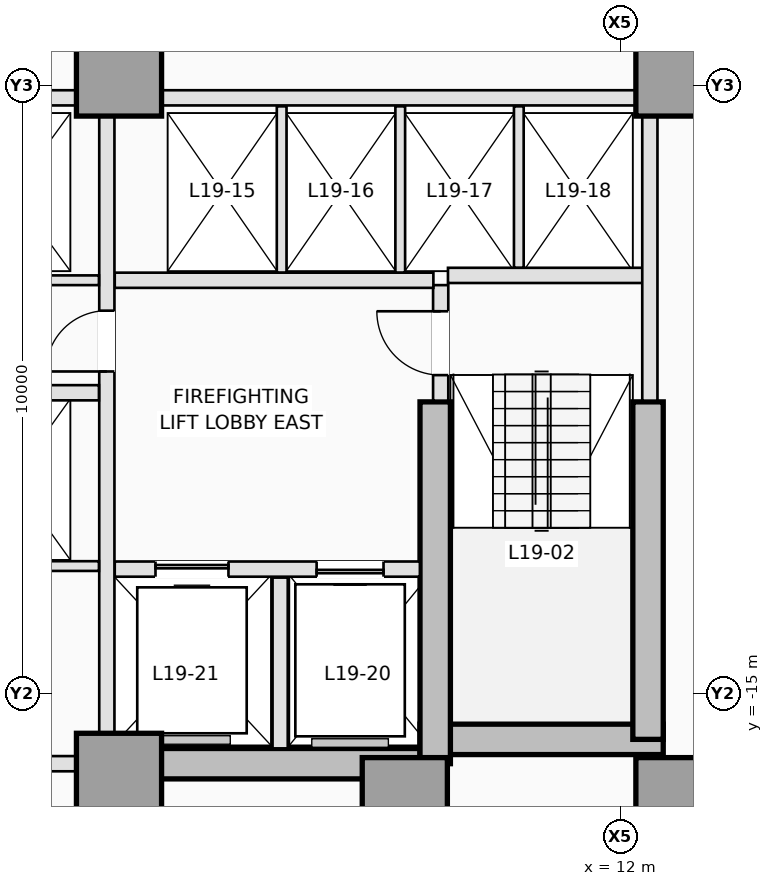
"""IFC4 building model, lengths in metres.
Left out: names, types, materials, properties, quantities, classifications, styles, units other than length and angle.
Written with IfcOpenShell. Run it as: python <this file> out.ifc"""

import sys

from ifc_helpers import new_model, si_unit, direction, frame, frame_2d, origin, origin_2d, place, context, subcontext, project, spatial, rectangle, extrude, element, fill, save


model = new_model("IFC4")
c1 = context("Model", 3, precision=1e-05, world=origin(), true_north=direction((0.0, 1.0)))
c2 = subcontext(c1, "Body", "Model", "MODEL_VIEW")
j1 = project(units=[si_unit("LENGTHUNIT", "METRE"), si_unit("PLANEANGLEUNIT", "RADIAN")], contexts=[c1])
p1 = place(None, origin())
s1 = spatial("IfcSite", under=j1, at=p1, CompositionType="ELEMENT")
p2 = place(p1, origin())
s2 = spatial("IfcBuilding", under=s1, at=p2, CompositionType="ELEMENT")
p3 = place(p2, frame((0.0, 0.0, 73.1)))
s3 = spatial("IfcBuildingStorey", under=s2, at=p3, CompositionType="ELEMENT", Elevation=73.1)
p4 = place(p3, frame((3.75, -16.15, 0.0), z_axis=(0.0, 0.0, 1.0), x_axis=(1.0, 0.0, 0.0)))
e1 = element("IfcWall", 1, at=p4, inside=s3, PredefinedType="SHEAR", context=c2, shape_type="SweptSolid", body=[
    extrude(rectangle(XDim=5.2, YDim=0.5, at=frame_2d((2.6, 0.0))), origin(), (0.0, 0.0, 1.0), 3.5),
])
p5 = place(p3, frame((8.7, -15.75, 0.0), z_axis=(0.0, 0.0, 1.0), x_axis=(1.0, 0.0, 0.0)))
e2 = element("IfcWall", 2, at=p5, inside=s3, PredefinedType="SHEAR", context=c2, shape_type="SweptSolid", body=[
    extrude(rectangle(XDim=4.0, YDim=0.5, at=frame_2d((2.0, 0.0))), origin(), (0.0, 0.0, 1.0), 3.5),
])
p6 = place(p3, frame((12.45, -15.75, 0.0), z_axis=(0.0, 0.0, 1.0), x_axis=(0.0, 1.0, 0.0)))
e3 = element("IfcWall", 3, at=p6, inside=s3, PredefinedType="SHEAR", context=c2, shape_type="SweptSolid", body=[
    extrude(rectangle(XDim=5.55, YDim=0.5, at=frame_2d((2.775, 0.0))), origin(), (0.0, 0.0, 1.0), 3.5),
])
p7 = place(p3, frame((8.95, -16.15, 0.0), z_axis=(0.0, 0.0, 1.0), x_axis=(0.0, 1.0, 0.0)))
e4 = element("IfcWall", 4, at=p7, inside=s3, PredefinedType="SHEAR", context=c2, shape_type="SweptSolid", body=[
    extrude(rectangle(XDim=5.95, YDim=0.5, at=frame_2d((2.975, 0.0))), origin(), (0.0, 0.0, 1.0), 3.5),
])
for number, where, z_axis, x_axis in (
    (5, (3.75, -16.35, 0.0), (0.0, 0.0, 1.0), (1.0, 0.0, 0.0)),
    (6, (8.45, -16.75, 0.0), (0.0, 0.0, 1.0), (1.0, 0.0, 0.0)),
    (7, (12.95, -16.75, 0.0), (0.0, 0.0, 1.0), (1.0, 0.0, 0.0)),
    (8, (3.75, -4.8, 0.0), (0.0, 0.0, 1.0), (1.0, 0.0, 0.0)),
    (9, (12.95, -4.8, 0.0), (0.0, 0.0, 1.0), (1.0, 0.0, 0.0)),
):
    element("IfcColumn", number, at=place(p3, frame(where, z_axis=z_axis, x_axis=x_axis)), inside=s3, PredefinedType="COLUMN", context=c2, shape_type="SweptSolid", body=[
        extrude(rectangle(XDim=1.4, YDim=1.4, at=origin_2d()), origin(), (0.0, 0.0, 1.0), 3.5),
    ])
p8 = place(p3, frame((9.04, -10.18, 0.0), z_axis=(0.0, 0.0, 1.0), x_axis=(0.0, 1.0, 0.0)))
e10 = element("IfcWall", 10, at=p8, inside=s3, PredefinedType="PARTITIONING", context=c2, shape_type="SweptSolid", body=[
    extrude(rectangle(XDim=1.9, YDim=0.25, at=frame_2d((0.95, 0.0))), origin(), (0.0, 0.0, 1.0), 3.25),
])
p9 = place(p8, frame((0.42, 0.0, 0.0)))
e11 = element("IfcOpeningElement", 11, at=p9, cuts=e10, PredefinedType="OPENING", context=c2, shape_type="SweptSolid", body=[
    extrude(rectangle(XDim=1.05, YDim=2.15, at=frame_2d((0.525, 1.075))), frame((0.0, 0.135, 0.0), z_axis=(0.0, -1.0, 0.0), x_axis=(1.0, 0.0, 0.0)), (0.0, 0.0, 1.0), 0.27),
])
p10 = place(p3, frame((9.16, -8.12, 0.0), z_axis=(0.0, 0.0, 1.0), x_axis=(1.0, 0.0, 0.0)))
e12 = element("IfcWall", 12, at=p10, inside=s3, PredefinedType="PARTITIONING", context=c2, shape_type="SweptSolid", body=[
    extrude(rectangle(XDim=3.22, YDim=0.25, at=frame_2d((1.61, 0.0))), origin(), (0.0, 0.0, 1.0), 3.25),
])
p11 = place(p3, frame((12.48, -10.18, 0.0), z_axis=(0.0, 0.0, 1.0), x_axis=(0.0, 1.0, 0.0)))
e13 = element("IfcWall", 13, at=p11, inside=s3, PredefinedType="PARTITIONING", context=c2, shape_type="SweptSolid", body=[
    extrude(rectangle(XDim=4.678, YDim=0.25, at=frame_2d((2.339, 0.0))), origin(), (0.0, 0.0, 1.0), 3.25),
])
p12 = place(p3, frame((3.68, -12.95, 0.0), z_axis=(0.0, 0.0, 1.0), x_axis=(1.0, 0.0, 0.0)))
e14 = element("IfcWall", 14, at=p12, inside=s3, PredefinedType="PARTITIONING", context=c2, shape_type="SweptSolid", body=[
    extrude(rectangle(XDim=5.018, YDim=0.25, at=frame_2d((2.509, 0.0))), origin(), (0.0, 0.0, 1.0), 3.25),
])
p13 = place(p12, frame((3.32, 0.0, 0.0)))
e15 = element("IfcOpeningElement", 15, at=p13, cuts=e14, PredefinedType="OPENING", context=c2, shape_type="SweptSolid", body=[
    extrude(rectangle(XDim=1.1, YDim=2.15, at=frame_2d((0.55, 1.075))), frame((0.0, 0.135, 0.0), z_axis=(0.0, -1.0, 0.0), x_axis=(1.0, 0.0, 0.0)), (0.0, 0.0, 1.0), 0.27),
])
p14 = place(p12, frame((0.67, 0.0, 0.0)))
e16 = element("IfcOpeningElement", 16, at=p14, cuts=e14, PredefinedType="OPENING", context=c2, shape_type="SweptSolid", body=[
    extrude(rectangle(XDim=1.2, YDim=2.15, at=frame_2d((0.6, 1.075))), frame((0.0, 0.135, 0.0), z_axis=(0.0, -1.0, 0.0), x_axis=(1.0, 0.0, 0.0)), (0.0, 0.0, 1.0), 0.27),
])
p15 = place(p3, frame((6.4, -15.898, 0.0), z_axis=(0.0, 0.0, 1.0), x_axis=(0.0, 1.0, 0.0)))
e17 = element("IfcWall", 17, at=p15, inside=s3, PredefinedType="PARTITIONING", context=c2, shape_type="SweptSolid", body=[
    extrude(rectangle(XDim=2.808, YDim=0.25, at=frame_2d((1.404, 0.0))), origin(), (0.0, 0.0, 1.0), 3.25),
])
p16 = place(p3, frame((3.68, -8.2, 0.0), z_axis=(0.0, 0.0, 1.0), x_axis=(1.0, 0.0, 0.0)))
e18 = element("IfcWall", 18, at=p16, inside=s3, PredefinedType="PARTITIONING", context=c2, shape_type="SweptSolid", body=[
    extrude(rectangle(XDim=5.24, YDim=0.25, at=frame_2d((2.62, 0.0))), origin(), (0.0, 0.0, 1.0), 3.25),
])
p17 = place(p3, frame((3.55, -15.648, 0.0), z_axis=(0.0, 0.0, 1.0), x_axis=(0.0, 1.0, 0.0)))
e19 = element("IfcWall", 19, at=p17, inside=s3, PredefinedType="PARTITIONING", context=c2, shape_type="SweptSolid", body=[
    extrude(rectangle(XDim=10.146, YDim=0.25, at=frame_2d((5.073, 0.0))), origin(), (0.0, 0.0, 1.0), 3.25),
])
p18 = place(p17, frame((5.948, 0.0, 0.0)))
e20 = element("IfcOpeningElement", 20, at=p18, cuts=e19, PredefinedType="OPENING", context=c2, shape_type="SweptSolid", body=[
    extrude(rectangle(XDim=1.0, YDim=2.15, at=frame_2d((0.5, 1.075))), frame((0.0, 0.135, 0.0), z_axis=(0.0, -1.0, 0.0), x_axis=(1.0, 0.0, 0.0)), (0.0, 0.0, 1.0), 0.27),
])
p19 = place(p3, frame((4.452, -5.2, 0.0), z_axis=(0.0, 0.0, 1.0), x_axis=(1.0, 0.0, 0.0)))
e21 = element("IfcWall", 21, at=p19, inside=s3, PredefinedType="PARTITIONING", context=c2, shape_type="SweptSolid", body=[
    extrude(rectangle(XDim=7.796, YDim=0.25, at=frame_2d((3.898, 0.0))), origin(), (0.0, 0.0, 1.0), 3.25),
])
p20 = place(p3, frame((0.95, -5.2, 0.0), z_axis=(0.0, 0.0, 1.0), x_axis=(1.0, 0.0, 0.0)))
e22 = element("IfcWall", 22, at=p20, inside=s3, PredefinedType="PARTITIONING", context=c2, shape_type="SweptSolid", body=[
    extrude(rectangle(XDim=2.098, YDim=0.25, at=frame_2d((1.049, 0.0))), origin(), (0.0, 0.0, 1.0), 3.25),
])
for number, where, z_axis, x_axis in (
    (23, (6.425, -8.073, 0.0), (0.0, 0.0, 1.0), (0.0, 1.0, 0.0)),
    (24, (8.375, -8.073, 0.0), (0.0, 0.0, 1.0), (0.0, 1.0, 0.0)),
):
    element("IfcWall", number, at=place(p3, frame(where, z_axis=z_axis, x_axis=x_axis)), inside=s3, PredefinedType="PARTITIONING", context=c2, shape_type="SweptSolid", body=[
        extrude(rectangle(XDim=2.733, YDim=0.16, at=frame_2d((1.366, 0.0))), origin(), (0.0, 0.0, 1.0), 3.25),
    ])
p21 = place(p3, frame((10.325, -7.993, 0.0), z_axis=(0.0, 0.0, 1.0), x_axis=(0.0, 1.0, 0.0)))
e25 = element("IfcWall", 25, at=p21, inside=s3, PredefinedType="PARTITIONING", context=c2, shape_type="SweptSolid", body=[
    extrude(rectangle(XDim=2.653, YDim=0.16, at=frame_2d((1.326, 0.0))), origin(), (0.0, 0.0, 1.0), 3.25),
])
p22 = place(p3, frame((-3.048, -16.15, 0.0), z_axis=(0.0, 0.0, 1.0), x_axis=(1.0, 0.0, 0.0)))
e26 = element("IfcWall", 26, at=p22, inside=s3, PredefinedType="PARTITIONING", context=c2, shape_type="SweptSolid", body=[
    extrude(rectangle(XDim=6.096, YDim=0.25, at=frame_2d((3.048, 0.0))), origin(), (0.0, 0.0, 1.0), 2.3),
])
p23 = place(p3, frame((0.95, -8.2, 0.0), z_axis=(0.0, 0.0, 1.0), x_axis=(1.0, 0.0, 0.0)))
e27 = element("IfcWall", 27, at=p23, inside=s3, PredefinedType="PARTITIONING", context=c2, shape_type="SweptSolid", body=[
    extrude(rectangle(XDim=2.47, YDim=0.16, at=frame_2d((1.235, 0.0))), origin(), (0.0, 0.0, 1.0), 3.25),
])
p24 = place(p3, frame((0.95, -10.05, 0.0), z_axis=(0.0, 0.0, 1.0), x_axis=(1.0, 0.0, 0.0)))
e28 = element("IfcWall", 28, at=p24, inside=s3, PredefinedType="PARTITIONING", context=c2, shape_type="SweptSolid", body=[
    extrude(rectangle(XDim=2.47, YDim=0.25, at=frame_2d((1.235, 0.0))), origin(), (0.0, 0.0, 1.0), 3.25),
])
p25 = place(p3, frame((-3.42, -12.9, 0.0), z_axis=(0.0, 0.0, 1.0), x_axis=(1.0, 0.0, 0.0)))
e29 = element("IfcWall", 29, at=p25, inside=s3, PredefinedType="PARTITIONING", context=c2, shape_type="SweptSolid", body=[
    extrude(rectangle(XDim=6.84, YDim=0.16, at=frame_2d((3.42, 0.0))), origin(), (0.0, 0.0, 1.0), 3.25),
])
p26 = place(p25, frame((2.98, 0.0, 0.0)))
e30 = element("IfcOpeningElement", 30, at=p26, cuts=e29, PredefinedType="OPENING", context=c2, shape_type="SweptSolid", body=[
    extrude(rectangle(XDim=0.88, YDim=2.12, at=frame_2d((0.44, 1.06))), frame((0.0, 0.09, 0.0), z_axis=(0.0, -1.0, 0.0), x_axis=(1.0, 0.0, 0.0)), (0.0, 0.0, 1.0), 0.18),
])
p27 = place(p13, origin())
e31 = element("IfcDoor", 31, at=p27, inside=s3, OperationType="SLIDING_TO_RIGHT", PredefinedType="DOOR", context=c2, shape_type="SweptSolid", body=[
    extrude(rectangle(XDim=1.1, YDim=2.15, at=frame_2d((0.55, 1.075))), frame((0.0, 0.025, 0.0), z_axis=(0.0, -1.0, 0.0), x_axis=(1.0, 0.0, 0.0)), (0.0, 0.0, 1.0), 0.05),
])
fill(e15, e31)
p28 = place(p14, origin())
e32 = element("IfcDoor", 32, at=p28, inside=s3, OperationType="SLIDING_TO_LEFT", PredefinedType="DOOR", context=c2, shape_type="SweptSolid", body=[
    extrude(rectangle(XDim=1.2, YDim=2.15, at=frame_2d((0.6, 1.075))), frame((0.0, 0.025, 0.0), z_axis=(0.0, -1.0, 0.0), x_axis=(1.0, 0.0, 0.0)), (0.0, 0.0, 1.0), 0.05),
])
fill(e16, e32)
p29 = place(p9, origin())
e33 = element("IfcDoor", 33, at=p29, inside=s3, OperationType="SINGLE_SWING_RIGHT", PredefinedType="DOOR", context=c2, shape_type="SweptSolid", body=[
    extrude(rectangle(XDim=1.05, YDim=2.15, at=frame_2d((0.525, 1.075))), frame((0.0, 0.025, 0.0), z_axis=(0.0, -1.0, 0.0), x_axis=(1.0, 0.0, 0.0)), (0.0, 0.0, 1.0), 0.05),
])
fill(e11, e33)
p30 = place(p18, origin())
e34 = element("IfcDoor", 34, at=p30, inside=s3, OperationType="SINGLE_SWING_LEFT", PredefinedType="DOOR", context=c2, shape_type="SweptSolid", body=[
    extrude(rectangle(XDim=1.0, YDim=2.15, at=frame_2d((0.5, 1.075))), frame((0.0, 0.025, 0.0), z_axis=(0.0, -1.0, 0.0), x_axis=(1.0, 0.0, 0.0)), (0.0, 0.0, 1.0), 0.05),
])
fill(e20, e34)
save(model, sys.argv[1])
